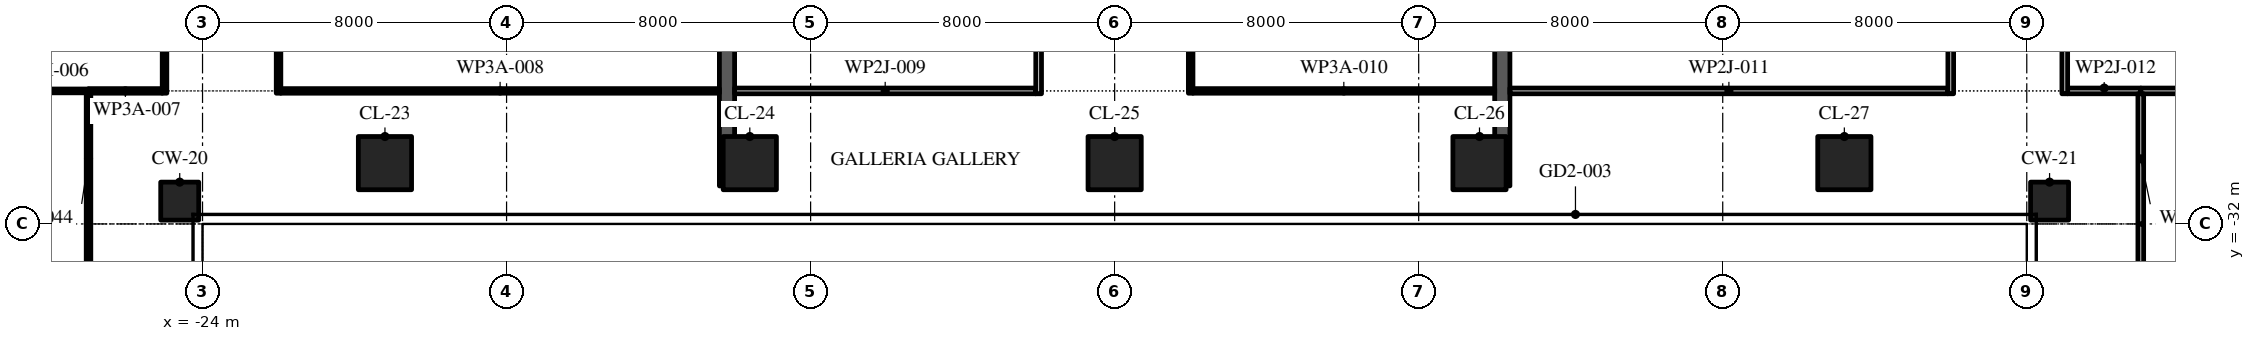
"""IFC4 building model, lengths in metres.
Left out: names, types, materials, properties, quantities, classifications, styles, units other than length and angle.
Written with IfcOpenShell. Run it as: python <this file> out.ifc"""

import sys

from ifc_helpers import new_model, si_unit, direction, frame, frame_2d, origin, origin_2d, place, context, subcontext, project, spatial, rectangle, extrude, element, save


model = new_model("IFC4")
c1 = context("Model", 3, precision=1e-05, world=origin(), true_north=direction((0.0, 1.0)))
c2 = subcontext(c1, "Body", "Model", "MODEL_VIEW")
j1 = project(units=[si_unit("LENGTHUNIT", "METRE"), si_unit("PLANEANGLEUNIT", "RADIAN")], contexts=[c1])
p1 = place(None, origin())
s1 = spatial("IfcSite", under=j1, at=p1, CompositionType="ELEMENT")
p2 = place(p1, origin())
s2 = spatial("IfcBuilding", under=s1, at=p2, CompositionType="ELEMENT")
p3 = place(p2, frame((0.0, 0.0, 28.8)))
s3 = spatial("IfcBuildingStorey", under=s2, at=p3, CompositionType="ELEMENT", Elevation=28.8)
for number, where, z_axis, x_axis in (
    (1, (-24.6, -31.4, 0.0), (0.0, 0.0, 1.0), (1.0, 0.0, 0.0)),
    (2, (24.6, -31.4, 0.0), (0.0, 0.0, 1.0), (1.0, 0.0, 0.0)),
):
    element("IfcColumn", number, at=place(p3, frame(where, z_axis=z_axis, x_axis=x_axis)), inside=s3, PredefinedType="COLUMN", context=c2, shape_type="SweptSolid", body=[
        extrude(rectangle(XDim=1.0, YDim=1.0, at=origin_2d()), origin(), (0.0, 0.0, 1.0), 4.35),
    ])
for number, where, z_axis, x_axis in (
    (3, (-19.2, -30.4, 0.0), (0.0, 0.0, 1.0), (1.0, 0.0, 0.0)),
    (4, (-9.6, -30.4, 0.0), (0.0, 0.0, 1.0), (1.0, 0.0, 0.0)),
    (5, (0.0, -30.4, 0.0), (0.0, 0.0, 1.0), (1.0, 0.0, 0.0)),
    (6, (9.6, -30.4, 0.0), (0.0, 0.0, 1.0), (1.0, 0.0, 0.0)),
    (7, (19.2, -30.4, 0.0), (0.0, 0.0, 1.0), (1.0, 0.0, 0.0)),
):
    element("IfcColumn", number, at=place(p3, frame(where, z_axis=z_axis, x_axis=x_axis)), inside=s3, PredefinedType="COLUMN", context=c2, shape_type="SweptSolid", body=[
        extrude(rectangle(XDim=1.4, YDim=1.4, at=origin_2d()), origin(), (0.0, 0.0, 1.0), 4.8),
    ])
for number, where, z_axis, x_axis in (
    (8, (-10.2, -31.0, 0.0), (0.0, 0.0, 1.0), (0.0, 1.0, 0.0)),
    (9, (10.2, -31.0, 0.0), (0.0, 0.0, 1.0), (0.0, 1.0, 0.0)),
):
    element("IfcWall", number, at=place(p3, frame(where, z_axis=z_axis, x_axis=x_axis)), inside=s3, PredefinedType="SHEAR", context=c2, shape_type="SweptSolid", body=[
        extrude(rectangle(XDim=15.0, YDim=0.4, at=frame_2d((7.5, 0.0))), origin(), (0.0, 0.0, 1.0), 4.35),
    ])
p4 = place(p3, frame((-29.9, -28.5, 0.0), z_axis=(0.0, 0.0, 1.0), x_axis=(1.0, 0.0, 0.0)))
e10 = element("IfcWall", 10, at=p4, inside=s3, PredefinedType="PARTITIONING", context=c2, shape_type="SweptSolid", body=[
    extrude(rectangle(XDim=2.9, YDim=0.1, at=frame_2d((1.45, 0.0))), origin(), (0.0, 0.0, 1.0), 4.35),
])
p5 = place(p3, frame((-27.0, -28.5, 0.0), z_axis=(0.0, 0.0, 1.0), x_axis=(1.0, 0.0, 0.0)))
e11 = element("IfcWall", 11, at=p5, inside=s3, PredefinedType="PARTITIONING", context=c2, shape_type="SweptSolid", body=[
    extrude(rectangle(XDim=1.94, YDim=0.12, at=frame_2d((0.97, 0.0))), origin(), (0.0, 0.0, 1.0), 4.35),
])
p6 = place(p3, frame((-21.94, -28.5, 0.0), z_axis=(0.0, 0.0, 1.0), x_axis=(1.0, 0.0, 0.0)))
e12 = element("IfcWall", 12, at=p6, inside=s3, PredefinedType="PARTITIONING", context=c2, shape_type="SweptSolid", body=[
    extrude(rectangle(XDim=11.54, YDim=0.12, at=frame_2d((5.77, 0.0))), origin(), (0.0, 0.0, 1.0), 4.35),
])
p7 = place(p3, frame((-10.0, -28.5, 0.0), z_axis=(0.0, 0.0, 1.0), x_axis=(1.0, 0.0, 0.0)))
e13 = element("IfcWall", 13, at=p7, inside=s3, PredefinedType="PARTITIONING", context=c2, shape_type="SweptSolid", body=[
    extrude(rectangle(XDim=7.925, YDim=0.15, at=frame_2d((3.962, 0.0))), origin(), (0.0, 0.0, 1.0), 4.35),
])
p8 = place(p3, frame((2.06, -28.5, 0.0), z_axis=(0.0, 0.0, 1.0), x_axis=(1.0, 0.0, 0.0)))
e14 = element("IfcWall", 14, at=p8, inside=s3, PredefinedType="PARTITIONING", context=c2, shape_type="SweptSolid", body=[
    extrude(rectangle(XDim=7.94, YDim=0.12, at=frame_2d((3.97, 0.0))), origin(), (0.0, 0.0, 1.0), 4.35),
])
p9 = place(p3, frame((10.4, -28.5, 0.0), z_axis=(0.0, 0.0, 1.0), x_axis=(1.0, 0.0, 0.0)))
e15 = element("IfcWall", 15, at=p9, inside=s3, PredefinedType="PARTITIONING", context=c2, shape_type="SweptSolid", body=[
    extrude(rectangle(XDim=11.525, YDim=0.15, at=frame_2d((5.763, 0.0))), origin(), (0.0, 0.0, 1.0), 4.35),
])
p10 = place(p3, frame((25.075, -28.5, 0.0), z_axis=(0.0, 0.0, 1.0), x_axis=(1.0, 0.0, 0.0)))
e16 = element("IfcWall", 16, at=p10, inside=s3, PredefinedType="PARTITIONING", context=c2, shape_type="SweptSolid", body=[
    extrude(rectangle(XDim=1.925, YDim=0.15, at=frame_2d((0.962, 0.0))), origin(), (0.0, 0.0, 1.0), 4.35),
])
p11 = place(p3, frame((27.0, -28.5, 0.0), z_axis=(0.0, 0.0, 1.0), x_axis=(1.0, 0.0, 0.0)))
e17 = element("IfcWall", 17, at=p11, inside=s3, PredefinedType="PARTITIONING", context=c2, shape_type="SweptSolid", body=[
    extrude(rectangle(XDim=2.9, YDim=0.15, at=frame_2d((1.45, 0.0))), origin(), (0.0, 0.0, 1.0), 4.35),
])
p12 = place(p3, frame((-27.0, -42.0, 0.0), z_axis=(0.0, 0.0, 1.0), x_axis=(0.0, 1.0, 0.0)))
e18 = element("IfcWall", 18, at=p12, inside=s3, PredefinedType="PARTITIONING", context=c2, shape_type="SweptSolid", body=[
    extrude(rectangle(XDim=10.0, YDim=0.12, at=frame_2d((5.0, 0.0))), origin(), (0.0, 0.0, 1.0), 4.35),
])
p13 = place(p12, frame((4.1, 0.0, 0.0)))
e19 = element("IfcOpeningElement", 19, at=p13, cuts=e18, PredefinedType="OPENING", context=c2, shape_type="SweptSolid", body=[
    extrude(rectangle(XDim=1.8, YDim=2.1, at=frame_2d((0.9, 1.05))), frame((0.0, 0.07, 0.0), z_axis=(0.0, -1.0, 0.0), x_axis=(1.0, 0.0, 0.0)), (0.0, 0.0, 1.0), 0.14),
])
p14 = place(p3, frame((-27.0, -32.0, 0.0), z_axis=(0.0, 0.0, 1.0), x_axis=(0.0, 1.0, 0.0)))
e20 = element("IfcWall", 20, at=p14, inside=s3, PredefinedType="PARTITIONING", context=c2, shape_type="SweptSolid", body=[
    extrude(rectangle(XDim=3.44, YDim=0.12, at=frame_2d((1.72, 0.0))), origin(), (0.0, 0.0, 1.0), 4.35),
])
p15 = place(p3, frame((-25.0, -28.56, 0.0), z_axis=(0.0, 0.0, 1.0), x_axis=(0.0, 1.0, 0.0)))
e21 = element("IfcWall", 21, at=p15, inside=s3, PredefinedType="PARTITIONING", context=c2, shape_type="SweptSolid", body=[
    extrude(rectangle(XDim=7.56, YDim=0.12, at=frame_2d((3.78, 0.0))), origin(), (0.0, 0.0, 1.0), 4.35),
])
p16 = place(p15, frame((3.28, 0.0, 0.0)))
e22 = element("IfcOpeningElement", 22, at=p16, cuts=e21, PredefinedType="OPENING", context=c2, shape_type="SweptSolid", body=[
    extrude(rectangle(XDim=1.0, YDim=2.1, at=frame_2d((0.5, 1.05))), frame((0.0, 0.07, 0.0), z_axis=(0.0, -1.0, 0.0), x_axis=(1.0, 0.0, 0.0)), (0.0, 0.0, 1.0), 0.14),
])
p17 = place(p3, frame((-22.0, -28.56, 0.0), z_axis=(0.0, 0.0, 1.0), x_axis=(0.0, 1.0, 0.0)))
e23 = element("IfcWall", 23, at=p17, inside=s3, PredefinedType="PARTITIONING", context=c2, shape_type="SweptSolid", body=[
    extrude(rectangle(XDim=11.56, YDim=0.12, at=frame_2d((5.78, 0.0))), origin(), (0.0, 0.0, 1.0), 4.35),
])
p18 = place(p17, frame((5.28, 0.0, 0.0)))
e24 = element("IfcOpeningElement", 24, at=p18, cuts=e23, PredefinedType="OPENING", context=c2, shape_type="SweptSolid", body=[
    extrude(rectangle(XDim=1.0, YDim=2.1, at=frame_2d((0.5, 1.05))), frame((0.0, 0.07, 0.0), z_axis=(0.0, -1.0, 0.0), x_axis=(1.0, 0.0, 0.0)), (0.0, 0.0, 1.0), 0.14),
])
p19 = place(p3, frame((-2.0, -28.575, 0.0), z_axis=(0.0, 0.0, 1.0), x_axis=(0.0, 1.0, 0.0)))
e25 = element("IfcWall", 25, at=p19, inside=s3, PredefinedType="PARTITIONING", context=c2, shape_type="SweptSolid", body=[
    extrude(rectangle(XDim=15.575, YDim=0.15, at=frame_2d((7.788, 0.0))), origin(), (0.0, 0.0, 1.0), 4.35),
])
p20 = place(p19, frame((7.288, 0.0, 0.0)))
e26 = element("IfcOpeningElement", 26, at=p20, cuts=e25, PredefinedType="OPENING", context=c2, shape_type="SweptSolid", body=[
    extrude(rectangle(XDim=1.0, YDim=2.1, at=frame_2d((0.5, 1.05))), frame((0.0, 0.085, 0.0), z_axis=(0.0, -1.0, 0.0), x_axis=(1.0, 0.0, 0.0)), (0.0, 0.0, 1.0), 0.17),
])
p21 = place(p3, frame((2.0, -28.56, 0.0), z_axis=(0.0, 0.0, 1.0), x_axis=(0.0, 1.0, 0.0)))
e27 = element("IfcWall", 27, at=p21, inside=s3, PredefinedType="PARTITIONING", context=c2, shape_type="SweptSolid", body=[
    extrude(rectangle(XDim=11.06, YDim=0.12, at=frame_2d((5.53, 0.0))), origin(), (0.0, 0.0, 1.0), 4.35),
])
p22 = place(p21, frame((5.03, 0.0, 0.0)))
e28 = element("IfcOpeningElement", 28, at=p22, cuts=e27, PredefinedType="OPENING", context=c2, shape_type="SweptSolid", body=[
    extrude(rectangle(XDim=1.0, YDim=2.1, at=frame_2d((0.5, 1.05))), frame((0.0, 0.07, 0.0), z_axis=(0.0, -1.0, 0.0), x_axis=(1.0, 0.0, 0.0)), (0.0, 0.0, 1.0), 0.14),
])
p23 = place(p3, frame((22.0, -28.575, 0.0), z_axis=(0.0, 0.0, 1.0), x_axis=(0.0, 1.0, 0.0)))
e29 = element("IfcWall", 29, at=p23, inside=s3, PredefinedType="PARTITIONING", context=c2, shape_type="SweptSolid", body=[
    extrude(rectangle(XDim=11.575, YDim=0.15, at=frame_2d((5.788, 0.0))), origin(), (0.0, 0.0, 1.0), 4.35),
])
p24 = place(p23, frame((5.288, 0.0, 0.0)))
e30 = element("IfcOpeningElement", 30, at=p24, cuts=e29, PredefinedType="OPENING", context=c2, shape_type="SweptSolid", body=[
    extrude(rectangle(XDim=1.0, YDim=2.1, at=frame_2d((0.5, 1.05))), frame((0.0, 0.085, 0.0), z_axis=(0.0, -1.0, 0.0), x_axis=(1.0, 0.0, 0.0)), (0.0, 0.0, 1.0), 0.17),
])
p25 = place(p3, frame((25.0, -28.575, 0.0), z_axis=(0.0, 0.0, 1.0), x_axis=(0.0, 1.0, 0.0)))
e31 = element("IfcWall", 31, at=p25, inside=s3, PredefinedType="PARTITIONING", context=c2, shape_type="SweptSolid", body=[
    extrude(rectangle(XDim=9.075, YDim=0.15, at=frame_2d((4.538, 0.0))), origin(), (0.0, 0.0, 1.0), 4.35),
])
p26 = place(p25, frame((3.637, 0.0, 0.0)))
e32 = element("IfcOpeningElement", 32, at=p26, cuts=e31, PredefinedType="OPENING", context=c2, shape_type="SweptSolid", body=[
    extrude(rectangle(XDim=1.8, YDim=2.1, at=frame_2d((0.9, 1.05))), frame((0.0, 0.085, 0.0), z_axis=(0.0, -1.0, 0.0), x_axis=(1.0, 0.0, 0.0)), (0.0, 0.0, 1.0), 0.17),
])
p27 = place(p3, frame((27.0, -42.0, 0.0), z_axis=(0.0, 0.0, 1.0), x_axis=(0.0, 1.0, 0.0)))
e33 = element("IfcWall", 33, at=p27, inside=s3, PredefinedType="PARTITIONING", context=c2, shape_type="SweptSolid", body=[
    extrude(rectangle(XDim=10.0, YDim=0.15, at=frame_2d((5.0, 0.0))), origin(), (0.0, 0.0, 1.0), 4.35),
])
p28 = place(p27, frame((4.1, 0.0, 0.0)))
e34 = element("IfcOpeningElement", 34, at=p28, cuts=e33, PredefinedType="OPENING", context=c2, shape_type="SweptSolid", body=[
    extrude(rectangle(XDim=1.8, YDim=2.1, at=frame_2d((0.9, 1.05))), frame((0.0, 0.085, 0.0), z_axis=(0.0, -1.0, 0.0), x_axis=(1.0, 0.0, 0.0)), (0.0, 0.0, 1.0), 0.17),
])
p29 = place(p3, frame((27.0, -32.0, 0.0), z_axis=(0.0, 0.0, 1.0), x_axis=(0.0, 1.0, 0.0)))
e35 = element("IfcWall", 35, at=p29, inside=s3, PredefinedType="PARTITIONING", context=c2, shape_type="SweptSolid", body=[
    extrude(rectangle(XDim=3.425, YDim=0.15, at=frame_2d((1.712, 0.0))), origin(), (0.0, 0.0, 1.0), 4.35),
])
p30 = place(p3, frame((0.0, 0.0, 4.4)))
p31 = place(p30, frame((-22.5, -40.0, 0.0)))
p32 = place(p31, frame((0.0, 0.0, 0.35)))
e36 = element("IfcWindow", 36, at=p32, inside=s3, PartitioningType="SINGLE_PANEL", PredefinedType="SKYLIGHT", context=c2, shape_type="SweptSolid", body=[
    extrude(rectangle(XDim=2.4, YDim=14.8, at=origin_2d()), origin(), (0.0, 0.0, 1.0), 0.05),
])
p33 = place(p30, frame((-17.375, -40.0, 0.0)))
p34 = place(p33, frame((0.0, 0.0, 0.35)))
e37 = element("IfcWindow", 37, at=p34, inside=s3, PartitioningType="SINGLE_PANEL", PredefinedType="SKYLIGHT", context=c2, shape_type="SweptSolid", body=[
    extrude(rectangle(XDim=6.05, YDim=14.8, at=origin_2d()), origin(), (0.0, 0.0, 1.0), 0.05),
])
p35 = place(p30, frame((-10.425, -40.0, 0.0)))
p36 = place(p35, frame((0.0, 0.0, 0.35)))
e38 = element("IfcWindow", 38, at=p36, inside=s3, PartitioningType="SINGLE_PANEL", PredefinedType="SKYLIGHT", context=c2, shape_type="SweptSolid", body=[
    extrude(rectangle(XDim=6.05, YDim=14.8, at=origin_2d()), origin(), (0.0, 0.0, 1.0), 0.05),
])
p37 = place(p30, frame((-3.475, -40.0, 0.0)))
p38 = place(p37, frame((0.0, 0.0, 0.35)))
e39 = element("IfcWindow", 39, at=p38, inside=s3, PartitioningType="SINGLE_PANEL", PredefinedType="SKYLIGHT", context=c2, shape_type="SweptSolid", body=[
    extrude(rectangle(XDim=6.05, YDim=14.8, at=origin_2d()), origin(), (0.0, 0.0, 1.0), 0.05),
])
p39 = place(p30, frame((3.475, -40.0, 0.0)))
p40 = place(p39, frame((0.0, 0.0, 0.35)))
e40 = element("IfcWindow", 40, at=p40, inside=s3, PartitioningType="SINGLE_PANEL", PredefinedType="SKYLIGHT", context=c2, shape_type="SweptSolid", body=[
    extrude(rectangle(XDim=6.05, YDim=14.8, at=origin_2d()), origin(), (0.0, 0.0, 1.0), 0.05),
])
p41 = place(p30, frame((10.425, -40.0, 0.0)))
p42 = place(p41, frame((0.0, 0.0, 0.35)))
e41 = element("IfcWindow", 41, at=p42, inside=s3, PartitioningType="SINGLE_PANEL", PredefinedType="SKYLIGHT", context=c2, shape_type="SweptSolid", body=[
    extrude(rectangle(XDim=6.05, YDim=14.8, at=origin_2d()), origin(), (0.0, 0.0, 1.0), 0.05),
])
p43 = place(p30, frame((17.375, -40.0, 0.0)))
p44 = place(p43, frame((0.0, 0.0, 0.35)))
e42 = element("IfcWindow", 42, at=p44, inside=s3, PartitioningType="SINGLE_PANEL", PredefinedType="SKYLIGHT", context=c2, shape_type="SweptSolid", body=[
    extrude(rectangle(XDim=6.05, YDim=14.8, at=origin_2d()), origin(), (0.0, 0.0, 1.0), 0.05),
])
p45 = place(p30, frame((22.5, -40.0, 0.0)))
p46 = place(p45, frame((0.0, 0.0, 0.35)))
e43 = element("IfcWindow", 43, at=p46, inside=s3, PartitioningType="SINGLE_PANEL", PredefinedType="SKYLIGHT", context=c2, shape_type="SweptSolid", body=[
    extrude(rectangle(XDim=2.4, YDim=14.8, at=origin_2d()), origin(), (0.0, 0.0, 1.0), 0.05),
])
save(model, sys.argv[1])
